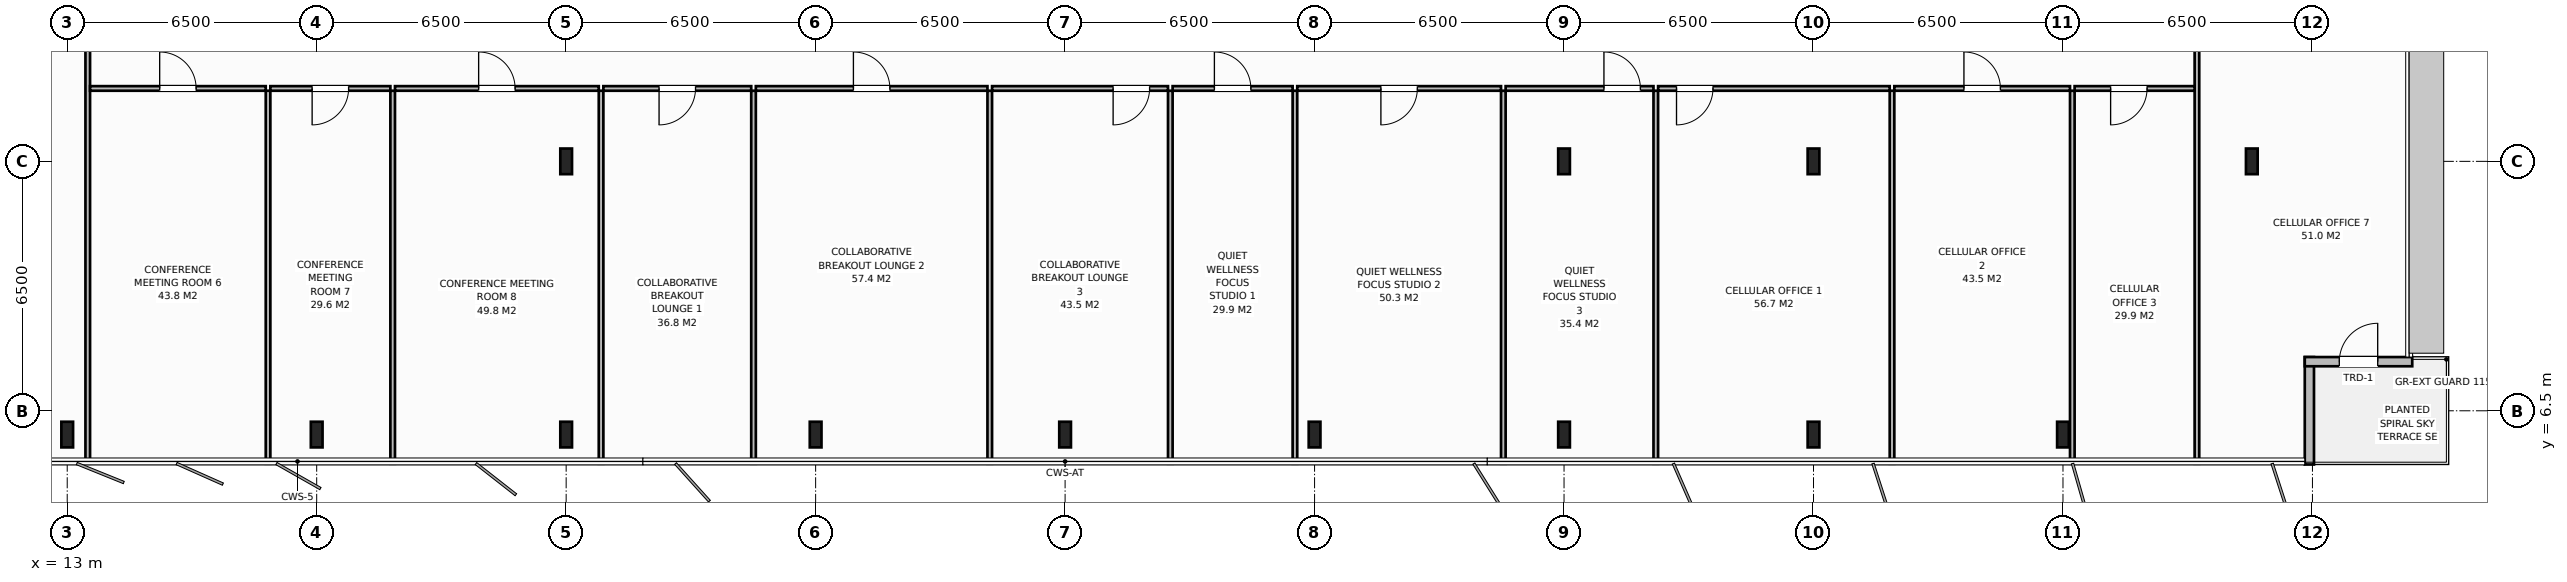
"""IFC4 building model, lengths in metres.
Left out: names, types, materials, properties, quantities, classifications, styles, units other than length and angle.
Written with IfcOpenShell. Run it as: python <this file> out.ifc"""

import sys

from ifc_helpers import new_model, si_unit, direction, frame, frame_2d, origin, origin_2d, place, context, subcontext, project, spatial, rectangle, i_section, extrude, element, fill, save


model = new_model("IFC4")
c1 = context("Model", 3, precision=1e-05, world=origin(), true_north=direction((0.0, 1.0)))
c2 = subcontext(c1, "Body", "Model", "MODEL_VIEW")
j1 = project(units=[si_unit("LENGTHUNIT", "METRE"), si_unit("PLANEANGLEUNIT", "RADIAN")], contexts=[c1])
p1 = place(None, origin())
s1 = spatial("IfcSite", under=j1, at=p1, CompositionType="ELEMENT")
p2 = place(p1, origin())
s2 = spatial("IfcBuilding", under=s1, at=p2, CompositionType="ELEMENT")
p3 = place(p2, frame((0.0, 0.0, 306.4)))
s3 = spatial("IfcBuildingStorey", under=s2, at=p3, CompositionType="ELEMENT", Elevation=306.4)
for number, where, z_axis, x_axis in (
    (1, (58.5, 13.0, 0.0), (0.0, 0.0, 1.0), (1.0, 0.0, 0.0)),
    (2, (26.0, 13.0, 0.0), (0.0, 0.0, 1.0), (1.0, 0.0, 0.0)),
    (3, (52.0, 13.0, 0.0), (0.0, 0.0, 1.0), (1.0, 0.0, 0.0)),
    (4, (13.0, 5.88, 0.0), (0.0, 0.0, 1.0), (1.0, 0.0, 0.0)),
    (5, (19.5, 5.88, 0.0), (0.0, 0.0, 1.0), (1.0, 0.0, 0.0)),
    (6, (26.0, 5.88, 0.0), (0.0, 0.0, 1.0), (1.0, 0.0, 0.0)),
    (7, (32.5, 5.88, 0.0), (0.0, 0.0, 1.0), (1.0, 0.0, 0.0)),
    (8, (39.0, 5.88, 0.0), (0.0, 0.0, 1.0), (1.0, 0.0, 0.0)),
    (9, (45.5, 5.88, 0.0), (0.0, 0.0, 1.0), (1.0, 0.0, 0.0)),
    (10, (52.0, 5.88, 0.0), (0.0, 0.0, 1.0), (1.0, 0.0, 0.0)),
    (11, (58.5, 5.88, 0.0), (0.0, 0.0, 1.0), (1.0, 0.0, 0.0)),
    (12, (65.0, 5.88, 0.0), (0.0, 0.0, 1.0), (1.0, 0.0, 0.0)),
    (13, (69.92, 13.0, 0.0), (0.0, 0.0, 1.0), (1.0, 0.0, 0.0)),
):
    element("IfcColumn", number, at=place(p3, frame(where, z_axis=z_axis, x_axis=x_axis)), inside=s3, PredefinedType="COLUMN", context=c2, shape_type="SweptSolid", body=[
        extrude(i_section(OverallWidth=0.305, OverallDepth=0.668, WebThickness=0.021, FlangeThickness=0.04, at=origin_2d()), origin(), (0.0, 0.0, 1.0), 4.0),
    ])
p4 = place(p3, frame((71.42, 7.9, 0.0), z_axis=(0.0, 0.0, 1.0), x_axis=(0.0, -1.0, 0.0)))
e14 = element("IfcWall", 14, at=p4, inside=s3, PredefinedType="STANDARD", context=c2, shape_type="SweptSolid", body=[
    extrude(rectangle(XDim=2.8, YDim=0.24, at=frame_2d((1.4, 0.0))), origin(), (0.0, 0.0, 1.0), 3.72),
])
p5 = place(p3, frame((74.1, 7.78, 0.0), z_axis=(0.0, 0.0, 1.0), x_axis=(-1.0, 0.0, 0.0)))
e15 = element("IfcWall", 15, at=p5, inside=s3, PredefinedType="STANDARD", context=c2, shape_type="SweptSolid", body=[
    extrude(rectangle(XDim=2.8, YDim=0.24, at=frame_2d((1.4, 0.0))), origin(), (0.0, 0.0, 1.0), 3.72),
])
p6 = place(p5, frame((0.9, 0.0, 0.0)))
e16 = element("IfcOpeningElement", 16, at=p6, cuts=e15, PredefinedType="OPENING", context=c2, shape_type="SweptSolid", body=[
    extrude(rectangle(XDim=1.0, YDim=2.2, at=frame_2d((0.5, 1.1))), frame((0.0, 0.13, 0.0), z_axis=(0.0, -1.0, 0.0), x_axis=(1.0, 0.0, 0.0)), (0.0, 0.0, 1.0), 0.26),
])
p7 = place(p3, frame((13.535, 5.12, 0.0), z_axis=(0.0, 0.0, 1.0), x_axis=(0.0, 1.0, 0.0)))
e17 = element("IfcWall", 17, at=p7, inside=s3, PredefinedType="PARTITIONING", context=c2, shape_type="SweptSolid", body=[
    extrude(rectangle(XDim=11.32, YDim=0.12, at=frame_2d((5.66, 0.0))), origin(), (0.0, 0.0, 1.0), 3.72),
])
p8 = place(p3, frame((18.233, 5.12, 0.0), z_axis=(0.0, 0.0, 1.0), x_axis=(0.0, 1.0, 0.0)))
e18 = element("IfcWall", 18, at=p8, inside=s3, PredefinedType="PARTITIONING", context=c2, shape_type="SweptSolid", body=[
    extrude(rectangle(XDim=9.72, YDim=0.12, at=frame_2d((4.86, 0.0))), origin(), (0.0, 0.0, 1.0), 3.72),
])
p9 = place(p3, frame((13.595, 14.9, 0.0), z_axis=(0.0, 0.0, 1.0), x_axis=(1.0, 0.0, 0.0)))
e19 = element("IfcWall", 19, at=p9, inside=s3, PredefinedType="PARTITIONING", context=c2, shape_type="SweptSolid", body=[
    extrude(rectangle(XDim=4.578, YDim=0.12, at=frame_2d((2.289, 0.0))), origin(), (0.0, 0.0, 1.0), 3.72),
])
p10 = place(p9, frame((1.814, 0.0, 0.0)))
e20 = element("IfcOpeningElement", 20, at=p10, cuts=e19, PredefinedType="OPENING", context=c2, shape_type="SweptSolid", body=[
    extrude(rectangle(XDim=0.95, YDim=2.15, at=frame_2d((0.475, 1.075))), frame((0.0, 0.07, 0.0), z_axis=(0.0, -1.0, 0.0), x_axis=(1.0, 0.0, 0.0)), (0.0, 0.0, 1.0), 0.14),
])
p11 = place(p3, frame((21.48, 5.12, 0.0), z_axis=(0.0, 0.0, 1.0), x_axis=(0.0, 1.0, 0.0)))
e21 = element("IfcWall", 21, at=p11, inside=s3, PredefinedType="PARTITIONING", context=c2, shape_type="SweptSolid", body=[
    extrude(rectangle(XDim=9.72, YDim=0.12, at=frame_2d((4.86, 0.0))), origin(), (0.0, 0.0, 1.0), 3.72),
])
p12 = place(p3, frame((18.293, 14.9, 0.0), z_axis=(0.0, 0.0, 1.0), x_axis=(1.0, 0.0, 0.0)))
e22 = element("IfcWall", 22, at=p12, inside=s3, PredefinedType="PARTITIONING", context=c2, shape_type="SweptSolid", body=[
    extrude(rectangle(XDim=3.127, YDim=0.12, at=frame_2d((1.563, 0.0))), origin(), (0.0, 0.0, 1.0), 3.72),
])
p13 = place(p12, frame((1.089, 0.0, 0.0)))
e23 = element("IfcOpeningElement", 23, at=p13, cuts=e22, PredefinedType="OPENING", context=c2, shape_type="SweptSolid", body=[
    extrude(rectangle(XDim=0.95, YDim=2.15, at=frame_2d((0.475, 1.075))), frame((0.0, 0.07, 0.0), z_axis=(0.0, -1.0, 0.0), x_axis=(1.0, 0.0, 0.0)), (0.0, 0.0, 1.0), 0.14),
])
p14 = place(p3, frame((26.909, 5.12, 0.0), z_axis=(0.0, 0.0, 1.0), x_axis=(0.0, 1.0, 0.0)))
e24 = element("IfcWall", 24, at=p14, inside=s3, PredefinedType="PARTITIONING", context=c2, shape_type="SweptSolid", body=[
    extrude(rectangle(XDim=9.72, YDim=0.12, at=frame_2d((4.86, 0.0))), origin(), (0.0, 0.0, 1.0), 3.72),
])
p15 = place(p3, frame((21.54, 14.9, 0.0), z_axis=(0.0, 0.0, 1.0), x_axis=(1.0, 0.0, 0.0)))
e25 = element("IfcWall", 25, at=p15, inside=s3, PredefinedType="PARTITIONING", context=c2, shape_type="SweptSolid", body=[
    extrude(rectangle(XDim=5.31, YDim=0.12, at=frame_2d((2.655, 0.0))), origin(), (0.0, 0.0, 1.0), 3.72),
])
p16 = place(p15, frame((2.18, 0.0, 0.0)))
e26 = element("IfcOpeningElement", 26, at=p16, cuts=e25, PredefinedType="OPENING", context=c2, shape_type="SweptSolid", body=[
    extrude(rectangle(XDim=0.95, YDim=2.15, at=frame_2d((0.475, 1.075))), frame((0.0, 0.07, 0.0), z_axis=(0.0, -1.0, 0.0), x_axis=(1.0, 0.0, 0.0)), (0.0, 0.0, 1.0), 0.14),
])
p17 = place(p3, frame((30.882, 5.12, 0.0), z_axis=(0.0, 0.0, 1.0), x_axis=(0.0, 1.0, 0.0)))
e27 = element("IfcWall", 27, at=p17, inside=s3, PredefinedType="PARTITIONING", context=c2, shape_type="SweptSolid", body=[
    extrude(rectangle(XDim=9.72, YDim=0.12, at=frame_2d((4.86, 0.0))), origin(), (0.0, 0.0, 1.0), 3.72),
])
p18 = place(p3, frame((26.969, 14.9, 0.0), z_axis=(0.0, 0.0, 1.0), x_axis=(1.0, 0.0, 0.0)))
e28 = element("IfcWall", 28, at=p18, inside=s3, PredefinedType="PARTITIONING", context=c2, shape_type="SweptSolid", body=[
    extrude(rectangle(XDim=3.853, YDim=0.12, at=frame_2d((1.926, 0.0))), origin(), (0.0, 0.0, 1.0), 3.72),
])
p19 = place(p18, frame((1.451, 0.0, 0.0)))
e29 = element("IfcOpeningElement", 29, at=p19, cuts=e28, PredefinedType="OPENING", context=c2, shape_type="SweptSolid", body=[
    extrude(rectangle(XDim=0.95, YDim=2.15, at=frame_2d((0.475, 1.075))), frame((0.0, 0.07, 0.0), z_axis=(0.0, -1.0, 0.0), x_axis=(1.0, 0.0, 0.0)), (0.0, 0.0, 1.0), 0.14),
])
p20 = place(p3, frame((37.037, 5.12, 0.0), z_axis=(0.0, 0.0, 1.0), x_axis=(0.0, 1.0, 0.0)))
e30 = element("IfcWall", 30, at=p20, inside=s3, PredefinedType="PARTITIONING", context=c2, shape_type="SweptSolid", body=[
    extrude(rectangle(XDim=9.72, YDim=0.12, at=frame_2d((4.86, 0.0))), origin(), (0.0, 0.0, 1.0), 3.72),
])
p21 = place(p3, frame((30.942, 14.9, 0.0), z_axis=(0.0, 0.0, 1.0), x_axis=(1.0, 0.0, 0.0)))
e31 = element("IfcWall", 31, at=p21, inside=s3, PredefinedType="PARTITIONING", context=c2, shape_type="SweptSolid", body=[
    extrude(rectangle(XDim=6.035, YDim=0.12, at=frame_2d((3.018, 0.0))), origin(), (0.0, 0.0, 1.0), 3.72),
])
p22 = place(p21, frame((2.542, 0.0, 0.0)))
e32 = element("IfcOpeningElement", 32, at=p22, cuts=e31, PredefinedType="OPENING", context=c2, shape_type="SweptSolid", body=[
    extrude(rectangle(XDim=0.95, YDim=2.15, at=frame_2d((0.475, 1.075))), frame((0.0, 0.07, 0.0), z_axis=(0.0, -1.0, 0.0), x_axis=(1.0, 0.0, 0.0)), (0.0, 0.0, 1.0), 0.14),
])
p23 = place(p3, frame((41.741, 5.12, 0.0), z_axis=(0.0, 0.0, 1.0), x_axis=(0.0, 1.0, 0.0)))
e33 = element("IfcWall", 33, at=p23, inside=s3, PredefinedType="PARTITIONING", context=c2, shape_type="SweptSolid", body=[
    extrude(rectangle(XDim=9.72, YDim=0.12, at=frame_2d((4.86, 0.0))), origin(), (0.0, 0.0, 1.0), 3.72),
])
p24 = place(p3, frame((37.097, 14.9, 0.0), z_axis=(0.0, 0.0, 1.0), x_axis=(1.0, 0.0, 0.0)))
e34 = element("IfcWall", 34, at=p24, inside=s3, PredefinedType="PARTITIONING", context=c2, shape_type="SweptSolid", body=[
    extrude(rectangle(XDim=4.584, YDim=0.12, at=frame_2d((2.292, 0.0))), origin(), (0.0, 0.0, 1.0), 3.72),
])
p25 = place(p24, frame((3.154, 0.0, 0.0)))
e35 = element("IfcOpeningElement", 35, at=p25, cuts=e34, PredefinedType="OPENING", context=c2, shape_type="SweptSolid", body=[
    extrude(rectangle(XDim=0.95, YDim=2.15, at=frame_2d((0.475, 1.075))), frame((0.0, 0.07, 0.0), z_axis=(0.0, -1.0, 0.0), x_axis=(1.0, 0.0, 0.0)), (0.0, 0.0, 1.0), 0.14),
])
p26 = place(p3, frame((44.988, 5.12, 0.0), z_axis=(0.0, 0.0, 1.0), x_axis=(0.0, 1.0, 0.0)))
e36 = element("IfcWall", 36, at=p26, inside=s3, PredefinedType="PARTITIONING", context=c2, shape_type="SweptSolid", body=[
    extrude(rectangle(XDim=9.72, YDim=0.12, at=frame_2d((4.86, 0.0))), origin(), (0.0, 0.0, 1.0), 3.72),
])
p27 = place(p3, frame((41.801, 14.9, 0.0), z_axis=(0.0, 0.0, 1.0), x_axis=(1.0, 0.0, 0.0)))
e37 = element("IfcWall", 37, at=p27, inside=s3, PredefinedType="PARTITIONING", context=c2, shape_type="SweptSolid", body=[
    extrude(rectangle(XDim=3.127, YDim=0.12, at=frame_2d((1.563, 0.0))), origin(), (0.0, 0.0, 1.0), 3.72),
])
p28 = place(p27, frame((1.089, 0.0, 0.0)))
e38 = element("IfcOpeningElement", 38, at=p28, cuts=e37, PredefinedType="OPENING", context=c2, shape_type="SweptSolid", body=[
    extrude(rectangle(XDim=0.95, YDim=2.15, at=frame_2d((0.475, 1.075))), frame((0.0, 0.07, 0.0), z_axis=(0.0, -1.0, 0.0), x_axis=(1.0, 0.0, 0.0)), (0.0, 0.0, 1.0), 0.14),
])
p29 = place(p3, frame((50.418, 5.12, 0.0), z_axis=(0.0, 0.0, 1.0), x_axis=(0.0, 1.0, 0.0)))
e39 = element("IfcWall", 39, at=p29, inside=s3, PredefinedType="PARTITIONING", context=c2, shape_type="SweptSolid", body=[
    extrude(rectangle(XDim=9.72, YDim=0.12, at=frame_2d((4.86, 0.0))), origin(), (0.0, 0.0, 1.0), 3.72),
])
p30 = place(p3, frame((45.048, 14.9, 0.0), z_axis=(0.0, 0.0, 1.0), x_axis=(1.0, 0.0, 0.0)))
e40 = element("IfcWall", 40, at=p30, inside=s3, PredefinedType="PARTITIONING", context=c2, shape_type="SweptSolid", body=[
    extrude(rectangle(XDim=5.31, YDim=0.12, at=frame_2d((2.655, 0.0))), origin(), (0.0, 0.0, 1.0), 3.72),
])
p31 = place(p30, frame((2.18, 0.0, 0.0)))
e41 = element("IfcOpeningElement", 41, at=p31, cuts=e40, PredefinedType="OPENING", context=c2, shape_type="SweptSolid", body=[
    extrude(rectangle(XDim=0.95, YDim=2.15, at=frame_2d((0.475, 1.075))), frame((0.0, 0.07, 0.0), z_axis=(0.0, -1.0, 0.0), x_axis=(1.0, 0.0, 0.0)), (0.0, 0.0, 1.0), 0.14),
])
p32 = place(p3, frame((54.39, 5.12, 0.0), z_axis=(0.0, 0.0, 1.0), x_axis=(0.0, 1.0, 0.0)))
e42 = element("IfcWall", 42, at=p32, inside=s3, PredefinedType="PARTITIONING", context=c2, shape_type="SweptSolid", body=[
    extrude(rectangle(XDim=9.72, YDim=0.12, at=frame_2d((4.86, 0.0))), origin(), (0.0, 0.0, 1.0), 3.72),
])
p33 = place(p3, frame((50.478, 14.9, 0.0), z_axis=(0.0, 0.0, 1.0), x_axis=(1.0, 0.0, 0.0)))
e43 = element("IfcWall", 43, at=p33, inside=s3, PredefinedType="PARTITIONING", context=c2, shape_type="SweptSolid", body=[
    extrude(rectangle(XDim=3.853, YDim=0.12, at=frame_2d((1.926, 0.0))), origin(), (0.0, 0.0, 1.0), 3.72),
])
p34 = place(p33, frame((2.562, 0.0, 0.0)))
e44 = element("IfcOpeningElement", 44, at=p34, cuts=e43, PredefinedType="OPENING", context=c2, shape_type="SweptSolid", body=[
    extrude(rectangle(XDim=0.95, YDim=2.15, at=frame_2d((0.475, 1.075))), frame((0.0, 0.07, 0.0), z_axis=(0.0, -1.0, 0.0), x_axis=(1.0, 0.0, 0.0)), (0.0, 0.0, 1.0), 0.14),
])
p35 = place(p3, frame((60.545, 5.12, 0.0), z_axis=(0.0, 0.0, 1.0), x_axis=(0.0, 1.0, 0.0)))
e45 = element("IfcWall", 45, at=p35, inside=s3, PredefinedType="PARTITIONING", context=c2, shape_type="SweptSolid", body=[
    extrude(rectangle(XDim=9.72, YDim=0.12, at=frame_2d((4.86, 0.0))), origin(), (0.0, 0.0, 1.0), 3.72),
])
p36 = place(p3, frame((54.45, 14.9, 0.0), z_axis=(0.0, 0.0, 1.0), x_axis=(1.0, 0.0, 0.0)))
e46 = element("IfcWall", 46, at=p36, inside=s3, PredefinedType="PARTITIONING", context=c2, shape_type="SweptSolid", body=[
    extrude(rectangle(XDim=6.035, YDim=0.12, at=frame_2d((3.018, 0.0))), origin(), (0.0, 0.0, 1.0), 3.72),
])
p37 = place(p36, frame((0.48, 0.0, 0.0)))
e47 = element("IfcOpeningElement", 47, at=p37, cuts=e46, PredefinedType="OPENING", context=c2, shape_type="SweptSolid", body=[
    extrude(rectangle(XDim=0.95, YDim=2.15, at=frame_2d((0.475, 1.075))), frame((0.0, 0.07, 0.0), z_axis=(0.0, -1.0, 0.0), x_axis=(1.0, 0.0, 0.0)), (0.0, 0.0, 1.0), 0.14),
])
p38 = place(p3, frame((65.243, 5.12, 0.0), z_axis=(0.0, 0.0, 1.0), x_axis=(0.0, 1.0, 0.0)))
e48 = element("IfcWall", 48, at=p38, inside=s3, PredefinedType="PARTITIONING", context=c2, shape_type="SweptSolid", body=[
    extrude(rectangle(XDim=9.72, YDim=0.12, at=frame_2d((4.86, 0.0))), origin(), (0.0, 0.0, 1.0), 3.72),
])
p39 = place(p3, frame((60.605, 14.9, 0.0), z_axis=(0.0, 0.0, 1.0), x_axis=(1.0, 0.0, 0.0)))
e49 = element("IfcWall", 49, at=p39, inside=s3, PredefinedType="PARTITIONING", context=c2, shape_type="SweptSolid", body=[
    extrude(rectangle(XDim=4.578, YDim=0.12, at=frame_2d((2.289, 0.0))), origin(), (0.0, 0.0, 1.0), 3.72),
])
p40 = place(p39, frame((1.814, 0.0, 0.0)))
e50 = element("IfcOpeningElement", 50, at=p40, cuts=e49, PredefinedType="OPENING", context=c2, shape_type="SweptSolid", body=[
    extrude(rectangle(XDim=0.95, YDim=2.15, at=frame_2d((0.475, 1.075))), frame((0.0, 0.07, 0.0), z_axis=(0.0, -1.0, 0.0), x_axis=(1.0, 0.0, 0.0)), (0.0, 0.0, 1.0), 0.14),
])
p41 = place(p3, frame((68.49, 5.12, 0.0), z_axis=(0.0, 0.0, 1.0), x_axis=(0.0, 1.0, 0.0)))
e51 = element("IfcWall", 51, at=p41, inside=s3, PredefinedType="PARTITIONING", context=c2, shape_type="SweptSolid", body=[
    extrude(rectangle(XDim=11.32, YDim=0.12, at=frame_2d((5.66, 0.0))), origin(), (0.0, 0.0, 1.0), 3.72),
])
p42 = place(p3, frame((65.303, 14.9, 0.0), z_axis=(0.0, 0.0, 1.0), x_axis=(1.0, 0.0, 0.0)))
e52 = element("IfcWall", 52, at=p42, inside=s3, PredefinedType="PARTITIONING", context=c2, shape_type="SweptSolid", body=[
    extrude(rectangle(XDim=3.127, YDim=0.12, at=frame_2d((1.563, 0.0))), origin(), (0.0, 0.0, 1.0), 3.72),
])
p43 = place(p42, frame((0.938, 0.0, 0.0)))
e53 = element("IfcOpeningElement", 53, at=p43, cuts=e52, PredefinedType="OPENING", context=c2, shape_type="SweptSolid", body=[
    extrude(rectangle(XDim=0.95, YDim=2.15, at=frame_2d((0.475, 1.075))), frame((0.0, 0.07, 0.0), z_axis=(0.0, -1.0, 0.0), x_axis=(1.0, 0.0, 0.0)), (0.0, 0.0, 1.0), 0.14),
])
p44 = place(p6, origin())
e54 = element("IfcDoor", 54, at=p44, inside=s3, OperationType="SINGLE_SWING_RIGHT", PredefinedType="DOOR", context=c2, shape_type="SweptSolid", body=[
    extrude(rectangle(XDim=1.0, YDim=2.2, at=frame_2d((0.5, 1.1))), frame((0.0, 0.025, 0.0), z_axis=(0.0, -1.0, 0.0), x_axis=(1.0, 0.0, 0.0)), (0.0, 0.0, 1.0), 0.05),
])
fill(e16, e54)
p45 = place(p10, origin())
e55 = element("IfcDoor", 55, at=p45, inside=s3, OperationType="SINGLE_SWING_LEFT", PredefinedType="DOOR", context=c2, shape_type="SweptSolid", body=[
    extrude(rectangle(XDim=0.95, YDim=2.15, at=frame_2d((0.475, 1.075))), frame((0.0, 0.025, 0.0), z_axis=(0.0, -1.0, 0.0), x_axis=(1.0, 0.0, 0.0)), (0.0, 0.0, 1.0), 0.05),
])
fill(e20, e55)
p46 = place(p13, origin())
e56 = element("IfcDoor", 56, at=p46, inside=s3, OperationType="SINGLE_SWING_RIGHT", PredefinedType="DOOR", context=c2, shape_type="SweptSolid", body=[
    extrude(rectangle(XDim=0.95, YDim=2.15, at=frame_2d((0.475, 1.075))), frame((0.0, 0.025, 0.0), z_axis=(0.0, -1.0, 0.0), x_axis=(1.0, 0.0, 0.0)), (0.0, 0.0, 1.0), 0.05),
])
fill(e23, e56)
p47 = place(p16, origin())
e57 = element("IfcDoor", 57, at=p47, inside=s3, OperationType="SINGLE_SWING_LEFT", PredefinedType="DOOR", context=c2, shape_type="SweptSolid", body=[
    extrude(rectangle(XDim=0.95, YDim=2.15, at=frame_2d((0.475, 1.075))), frame((0.0, 0.025, 0.0), z_axis=(0.0, -1.0, 0.0), x_axis=(1.0, 0.0, 0.0)), (0.0, 0.0, 1.0), 0.05),
])
fill(e26, e57)
p48 = place(p19, origin())
e58 = element("IfcDoor", 58, at=p48, inside=s3, OperationType="SINGLE_SWING_RIGHT", PredefinedType="DOOR", context=c2, shape_type="SweptSolid", body=[
    extrude(rectangle(XDim=0.95, YDim=2.15, at=frame_2d((0.475, 1.075))), frame((0.0, 0.025, 0.0), z_axis=(0.0, -1.0, 0.0), x_axis=(1.0, 0.0, 0.0)), (0.0, 0.0, 1.0), 0.05),
])
fill(e29, e58)
p49 = place(p22, origin())
e59 = element("IfcDoor", 59, at=p49, inside=s3, OperationType="SINGLE_SWING_LEFT", PredefinedType="DOOR", context=c2, shape_type="SweptSolid", body=[
    extrude(rectangle(XDim=0.95, YDim=2.15, at=frame_2d((0.475, 1.075))), frame((0.0, 0.025, 0.0), z_axis=(0.0, -1.0, 0.0), x_axis=(1.0, 0.0, 0.0)), (0.0, 0.0, 1.0), 0.05),
])
fill(e32, e59)
p50 = place(p25, origin())
e60 = element("IfcDoor", 60, at=p50, inside=s3, OperationType="SINGLE_SWING_RIGHT", PredefinedType="DOOR", context=c2, shape_type="SweptSolid", body=[
    extrude(rectangle(XDim=0.95, YDim=2.15, at=frame_2d((0.475, 1.075))), frame((0.0, 0.025, 0.0), z_axis=(0.0, -1.0, 0.0), x_axis=(1.0, 0.0, 0.0)), (0.0, 0.0, 1.0), 0.05),
])
fill(e35, e60)
p51 = place(p28, origin())
e61 = element("IfcDoor", 61, at=p51, inside=s3, OperationType="SINGLE_SWING_LEFT", PredefinedType="DOOR", context=c2, shape_type="SweptSolid", body=[
    extrude(rectangle(XDim=0.95, YDim=2.15, at=frame_2d((0.475, 1.075))), frame((0.0, 0.025, 0.0), z_axis=(0.0, -1.0, 0.0), x_axis=(1.0, 0.0, 0.0)), (0.0, 0.0, 1.0), 0.05),
])
fill(e38, e61)
p52 = place(p31, origin())
e62 = element("IfcDoor", 62, at=p52, inside=s3, OperationType="SINGLE_SWING_RIGHT", PredefinedType="DOOR", context=c2, shape_type="SweptSolid", body=[
    extrude(rectangle(XDim=0.95, YDim=2.15, at=frame_2d((0.475, 1.075))), frame((0.0, 0.025, 0.0), z_axis=(0.0, -1.0, 0.0), x_axis=(1.0, 0.0, 0.0)), (0.0, 0.0, 1.0), 0.05),
])
fill(e41, e62)
p53 = place(p34, origin())
e63 = element("IfcDoor", 63, at=p53, inside=s3, OperationType="SINGLE_SWING_LEFT", PredefinedType="DOOR", context=c2, shape_type="SweptSolid", body=[
    extrude(rectangle(XDim=0.95, YDim=2.15, at=frame_2d((0.475, 1.075))), frame((0.0, 0.025, 0.0), z_axis=(0.0, -1.0, 0.0), x_axis=(1.0, 0.0, 0.0)), (0.0, 0.0, 1.0), 0.05),
])
fill(e44, e63)
p54 = place(p37, origin())
e64 = element("IfcDoor", 64, at=p54, inside=s3, OperationType="SINGLE_SWING_RIGHT", PredefinedType="DOOR", context=c2, shape_type="SweptSolid", body=[
    extrude(rectangle(XDim=0.95, YDim=2.15, at=frame_2d((0.475, 1.075))), frame((0.0, 0.025, 0.0), z_axis=(0.0, -1.0, 0.0), x_axis=(1.0, 0.0, 0.0)), (0.0, 0.0, 1.0), 0.05),
])
fill(e47, e64)
p55 = place(p40, origin())
e65 = element("IfcDoor", 65, at=p55, inside=s3, OperationType="SINGLE_SWING_LEFT", PredefinedType="DOOR", context=c2, shape_type="SweptSolid", body=[
    extrude(rectangle(XDim=0.95, YDim=2.15, at=frame_2d((0.475, 1.075))), frame((0.0, 0.025, 0.0), z_axis=(0.0, -1.0, 0.0), x_axis=(1.0, 0.0, 0.0)), (0.0, 0.0, 1.0), 0.05),
])
fill(e50, e65)
p56 = place(p43, origin())
e66 = element("IfcDoor", 66, at=p56, inside=s3, OperationType="SINGLE_SWING_RIGHT", PredefinedType="DOOR", context=c2, shape_type="SweptSolid", body=[
    extrude(rectangle(XDim=0.95, YDim=2.15, at=frame_2d((0.475, 1.075))), frame((0.0, 0.025, 0.0), z_axis=(0.0, -1.0, 0.0), x_axis=(1.0, 0.0, 0.0)), (0.0, 0.0, 1.0), 0.05),
])
fill(e53, e66)
save(model, sys.argv[1])
